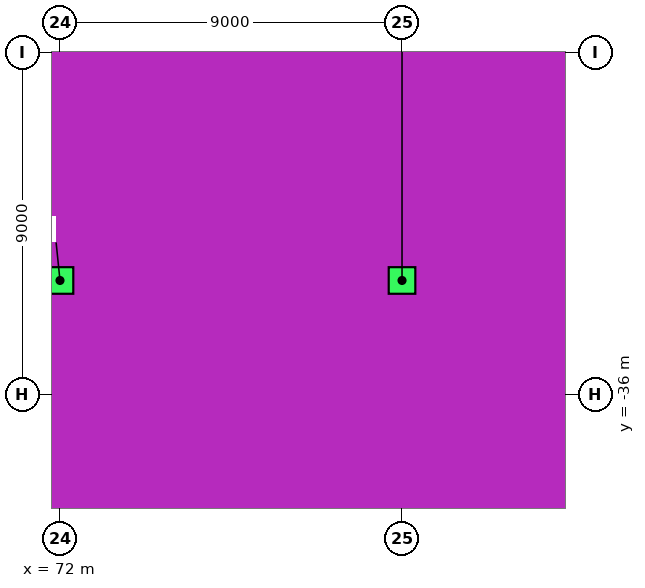
"""IFC4 building model, lengths in metres.
Left out: names, types, materials, properties, quantities, classifications, styles, units other than length and angle.
Written with IfcOpenShell. Run it as: python <this file> out.ifc"""

import sys

from ifc_helpers import new_model, si_unit, direction, frame, origin, origin_2d, place, context, subcontext, project, spatial, rectangle, extrude, element, save


model = new_model("IFC4")
c1 = context("Model", 3, precision=1e-05, world=origin(), true_north=direction((0.0, 1.0)))
c2 = subcontext(c1, "Body", "Model", "MODEL_VIEW")
j1 = project(units=[si_unit("LENGTHUNIT", "METRE"), si_unit("PLANEANGLEUNIT", "RADIAN")], contexts=[c1])
p1 = place(None, origin())
s1 = spatial("IfcSite", under=j1, at=p1, CompositionType="ELEMENT")
p2 = place(p1, origin())
s2 = spatial("IfcBuilding", under=s1, at=p2, CompositionType="ELEMENT")
p3 = place(p2, frame((0.0, 0.0, -4.5)))
s3 = spatial("IfcBuildingStorey", under=s2, at=p3, CompositionType="ELEMENT", Elevation=-4.5)
for number, where, z_axis, x_axis in (
    (1, (72.0, -33.0, 0.0), (0.0, 0.0, 1.0), (1.0, 0.0, 0.0)),
    (2, (81.0, -33.0, 0.0), (0.0, 0.0, 1.0), (1.0, 0.0, 0.0)),
):
    element("IfcColumn", number, at=place(p3, frame(where, z_axis=z_axis, x_axis=x_axis)), inside=s3, PredefinedType="COLUMN", context=c2, shape_type="SweptSolid", body=[
        extrude(rectangle(XDim=0.7, YDim=0.7, at=origin_2d()), origin(), (0.0, 0.0, 1.0), 4.0),
    ])
save(model, sys.argv[1])
